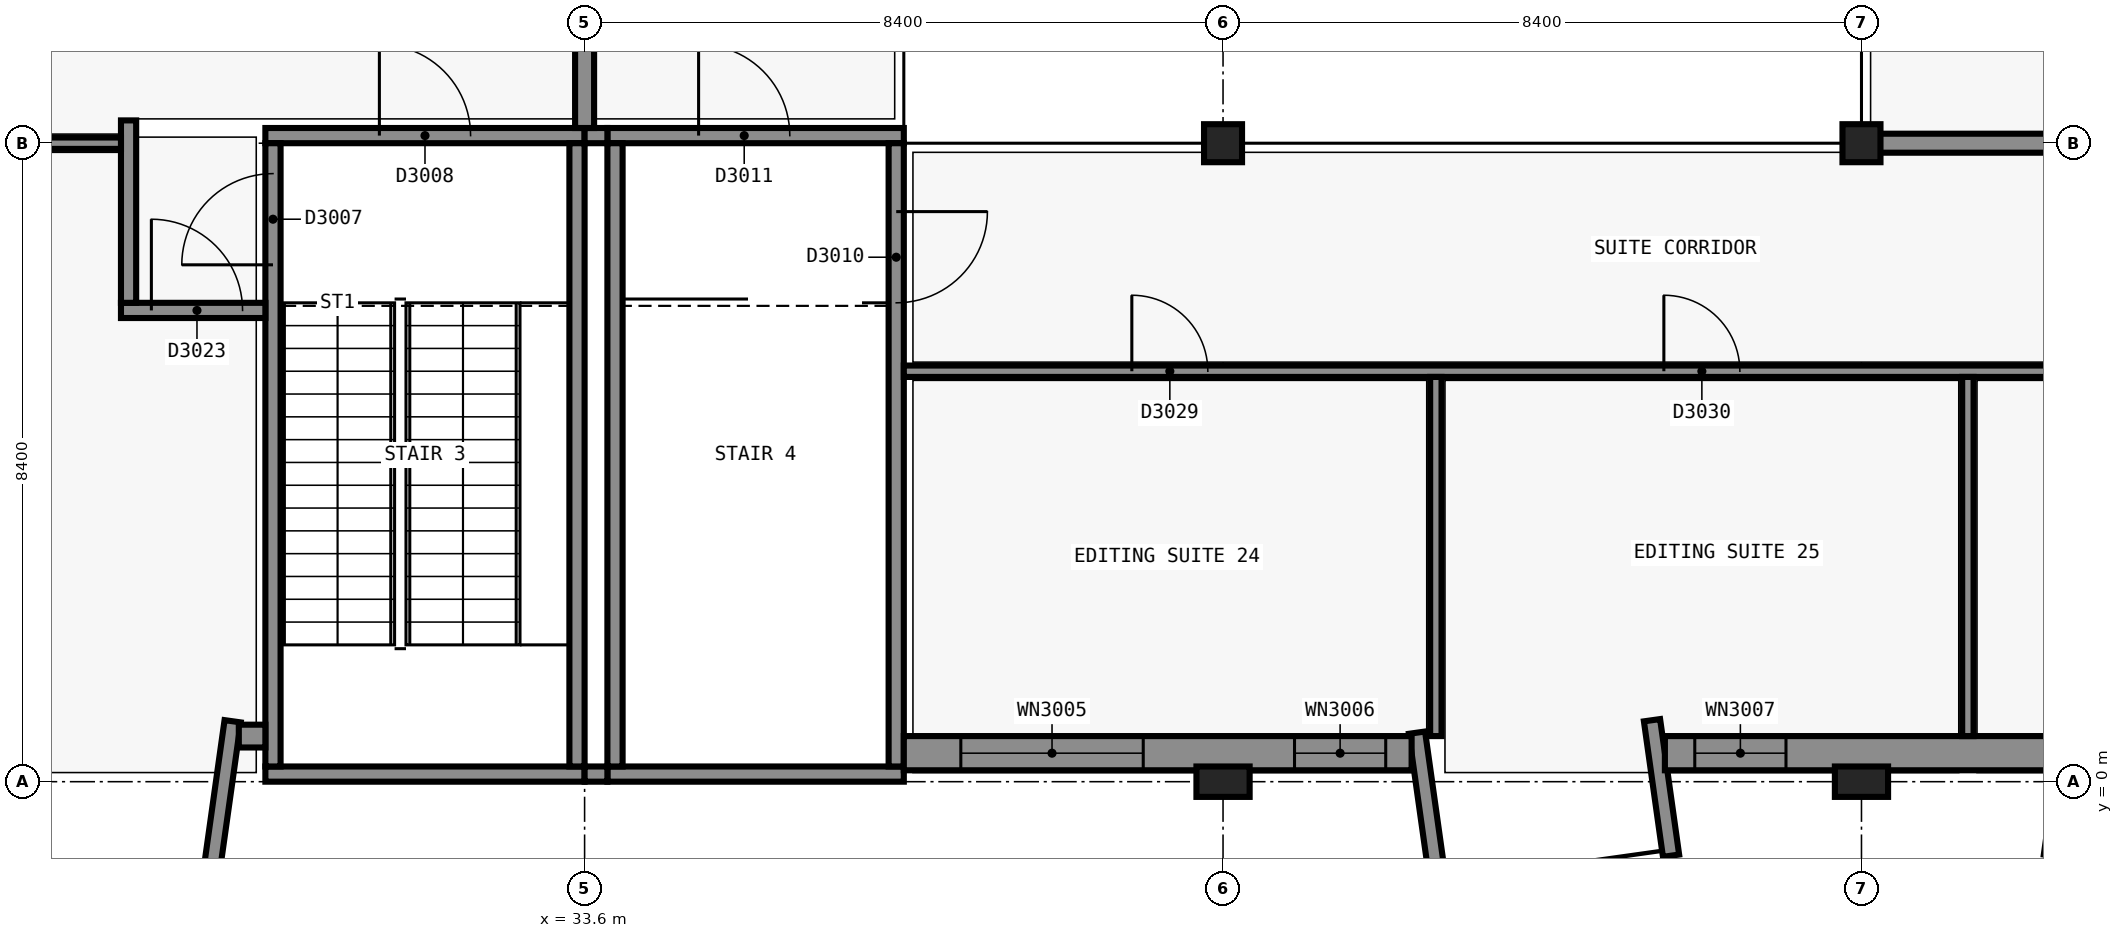
"""IFC4 building model, lengths in metres.
Left out: names, types, materials, properties, quantities, classifications, styles, units other than length and angle.
Written with IfcOpenShell. Run it as: python <this file> out.ifc"""

import sys

from ifc_helpers import new_model, si_unit, direction, frame, frame_2d, origin, origin_2d, place, context, subcontext, project, spatial, rectangle, extrude, element, fill, save


model = new_model("IFC4")
c1 = context("Model", 3, precision=1e-05, world=origin(), true_north=direction((0.0, 1.0)))
c2 = subcontext(c1, "Body", "Model", "MODEL_VIEW")
j1 = project(units=[si_unit("LENGTHUNIT", "METRE"), si_unit("PLANEANGLEUNIT", "RADIAN")], contexts=[c1])
p1 = place(None, origin())
s1 = spatial("IfcSite", under=j1, at=p1, CompositionType="ELEMENT")
p2 = place(p1, origin())
s2 = spatial("IfcBuilding", under=s1, at=p2, CompositionType="ELEMENT")
p3 = place(p2, frame((0.0, 0.0, 15.0)))
s3 = spatial("IfcBuildingStorey", under=s2, at=p3, CompositionType="ELEMENT", Elevation=15.0)
p4 = place(p3, frame((33.6, 0.1, 0.0), z_axis=(0.0, 0.0, 1.0), x_axis=(-1.0, 0.0, 0.0)))
e1 = element("IfcWall", 1, at=p4, inside=s3, PredefinedType="SHEAR", context=c2, shape_type="SweptSolid", body=[
    extrude(rectangle(XDim=4.2, YDim=0.2, at=frame_2d((2.1, 0.0))), origin(), (0.0, 0.0, 1.0), 4.8),
])
p5 = place(p3, frame((29.4, 8.5, 0.0), z_axis=(0.0, 0.0, 1.0), x_axis=(1.0, 0.0, 0.0)))
e2 = element("IfcWall", 2, at=p5, inside=s3, PredefinedType="SHEAR", context=c2, shape_type="SweptSolid", body=[
    extrude(rectangle(XDim=4.2, YDim=0.2, at=frame_2d((2.1, 0.0))), origin(), (0.0, 0.0, 1.0), 4.8),
])
p6 = place(p5, frame((1.5, 0.0, 0.0)))
e3 = element("IfcOpeningElement", 3, at=p6, cuts=e2, PredefinedType="OPENING", context=c2, shape_type="SweptSolid", body=[
    extrude(rectangle(XDim=1.2, YDim=2.1, at=frame_2d((0.6, 1.05))), frame((0.0, 0.11, 0.0), z_axis=(0.0, -1.0, 0.0), x_axis=(1.0, 0.0, 0.0)), (0.0, 0.0, 1.0), 0.22),
])
p7 = place(p3, frame((29.5, 0.2, 0.0), z_axis=(0.0, 0.0, 1.0), x_axis=(0.0, 1.0, 0.0)))
e4 = element("IfcWall", 4, at=p7, inside=s3, PredefinedType="SHEAR", context=c2, shape_type="SweptSolid", body=[
    extrude(rectangle(XDim=8.2, YDim=0.2, at=frame_2d((4.1, 0.0))), origin(), (0.0, 0.0, 1.0), 4.8),
])
p8 = place(p7, frame((6.6, 0.0, 0.0)))
e5 = element("IfcOpeningElement", 5, at=p8, cuts=e4, PredefinedType="OPENING", context=c2, shape_type="SweptSolid", body=[
    extrude(rectangle(XDim=1.2, YDim=2.1, at=frame_2d((0.6, 1.05))), frame((0.0, 0.11, 0.0), z_axis=(0.0, -1.0, 0.0), x_axis=(1.0, 0.0, 0.0)), (0.0, 0.0, 1.0), 0.22),
])
p9 = place(p3, frame((33.5, 8.4, 0.0), z_axis=(0.0, 0.0, 1.0), x_axis=(0.0, -1.0, 0.0)))
e6 = element("IfcWall", 6, at=p9, inside=s3, PredefinedType="SHEAR", context=c2, shape_type="SweptSolid", body=[
    extrude(rectangle(XDim=8.2, YDim=0.2, at=frame_2d((4.1, 0.0))), origin(), (0.0, 0.0, 1.0), 4.8),
])
p10 = place(p3, frame((37.8, 0.1, 0.0), z_axis=(0.0, 0.0, 1.0), x_axis=(-1.0, 0.0, 0.0)))
e7 = element("IfcWall", 7, at=p10, inside=s3, PredefinedType="SHEAR", context=c2, shape_type="SweptSolid", body=[
    extrude(rectangle(XDim=3.9, YDim=0.2, at=frame_2d((1.95, 0.0))), origin(), (0.0, 0.0, 1.0), 4.8),
])
p11 = place(p3, frame((33.9, 8.5, 0.0), z_axis=(0.0, 0.0, 1.0), x_axis=(1.0, 0.0, 0.0)))
e8 = element("IfcWall", 8, at=p11, inside=s3, PredefinedType="SHEAR", context=c2, shape_type="SweptSolid", body=[
    extrude(rectangle(XDim=3.9, YDim=0.2, at=frame_2d((1.95, 0.0))), origin(), (0.0, 0.0, 1.0), 4.8),
])
p12 = place(p11, frame((1.2, 0.0, 0.0)))
e9 = element("IfcOpeningElement", 9, at=p12, cuts=e8, PredefinedType="OPENING", context=c2, shape_type="SweptSolid", body=[
    extrude(rectangle(XDim=1.2, YDim=2.1, at=frame_2d((0.6, 1.05))), frame((0.0, 0.11, 0.0), z_axis=(0.0, -1.0, 0.0), x_axis=(1.0, 0.0, 0.0)), (0.0, 0.0, 1.0), 0.22),
])
p13 = place(p3, frame((34.0, 0.2, 0.0), z_axis=(0.0, 0.0, 1.0), x_axis=(0.0, 1.0, 0.0)))
e10 = element("IfcWall", 10, at=p13, inside=s3, PredefinedType="SHEAR", context=c2, shape_type="SweptSolid", body=[
    extrude(rectangle(XDim=8.2, YDim=0.2, at=frame_2d((4.1, 0.0))), origin(), (0.0, 0.0, 1.0), 4.8),
])
p14 = place(p3, frame((37.7, 8.4, 0.0), z_axis=(0.0, 0.0, 1.0), x_axis=(0.0, -1.0, 0.0)))
e11 = element("IfcWall", 11, at=p14, inside=s3, PredefinedType="SHEAR", context=c2, shape_type="SweptSolid", body=[
    extrude(rectangle(XDim=8.2, YDim=0.2, at=frame_2d((4.1, 0.0))), origin(), (0.0, 0.0, 1.0), 4.8),
])
p15 = place(p14, frame((0.9, 0.0, 0.0)))
e12 = element("IfcOpeningElement", 12, at=p15, cuts=e11, PredefinedType="OPENING", context=c2, shape_type="SweptSolid", body=[
    extrude(rectangle(XDim=1.2, YDim=2.1, at=frame_2d((0.6, 1.05))), frame((0.0, 0.11, 0.0), z_axis=(0.0, -1.0, 0.0), x_axis=(1.0, 0.0, 0.0)), (0.0, 0.0, 1.0), 0.22),
])
p16 = place(p3, frame((42.0, 0.0, 0.0), z_axis=(0.0, 0.0, 1.0), x_axis=(1.0, 0.0, 0.0)))
e13 = element("IfcColumn", 13, at=p16, inside=s3, PredefinedType="COLUMN", context=c2, shape_type="SweptSolid", body=[
    extrude(rectangle(XDim=0.7, YDim=0.4, at=origin_2d()), origin(), (0.0, 0.0, 1.0), 4.8),
])
p17 = place(p3, frame((42.0, 8.4, 0.0), z_axis=(0.0, 0.0, 1.0), x_axis=(1.0, 0.0, 0.0)))
e14 = element("IfcColumn", 14, at=p17, inside=s3, PredefinedType="COLUMN", context=c2, shape_type="SweptSolid", body=[
    extrude(rectangle(XDim=0.5, YDim=0.5, at=origin_2d()), origin(), (0.0, 0.0, 1.0), 4.8),
])
p18 = place(p3, frame((50.4, 0.0, 0.0), z_axis=(0.0, 0.0, 1.0), x_axis=(1.0, 0.0, 0.0)))
e15 = element("IfcColumn", 15, at=p18, inside=s3, PredefinedType="COLUMN", context=c2, shape_type="SweptSolid", body=[
    extrude(rectangle(XDim=0.7, YDim=0.4, at=origin_2d()), origin(), (0.0, 0.0, 1.0), 4.8),
])
p19 = place(p3, frame((50.4, 8.4, 0.0), z_axis=(0.0, 0.0, 1.0), x_axis=(1.0, 0.0, 0.0)))
e16 = element("IfcColumn", 16, at=p19, inside=s3, PredefinedType="COLUMN", context=c2, shape_type="SweptSolid", body=[
    extrude(rectangle(XDim=0.5, YDim=0.5, at=origin_2d()), origin(), (0.0, 0.0, 1.0), 4.8),
])
for number, where, z_axis, x_axis in (
    (17, (33.9, 0.1, 0.0), (0.0, 0.0, 1.0), (-1.0, 0.0, 0.0)),
    (18, (33.6, 8.5, 0.0), (0.0, 0.0, 1.0), (1.0, 0.0, 0.0)),
):
    element("IfcWall", number, at=place(p3, frame(where, z_axis=z_axis, x_axis=x_axis)), inside=s3, PredefinedType="SHEAR", context=c2, shape_type="SweptSolid", body=[
        extrude(rectangle(XDim=0.3, YDim=0.2, at=frame_2d((0.15, 0.0))), origin(), (0.0, 0.0, 1.0), 4.8),
    ])
p20 = place(p3, frame((28.969, 0.795, 0.0), z_axis=(0.0, 0.0, 1.0), x_axis=(-0.139249775508, -0.99025728981, 0.0)))
e19 = element("IfcWall", 19, at=p20, inside=s3, PredefinedType="SOLIDWALL", context=c2, shape_type="SweptSolid", body=[
    extrude(rectangle(XDim=2.22, YDim=0.215, at=frame_2d((1.11, 0.0))), origin(), (0.0, 0.0, 1.0), 4.5),
])
p21 = place(p3, frame((29.4, 0.6, 0.0), z_axis=(0.0, 0.0, 1.0), x_axis=(-1.0, 0.0, 0.0)))
e20 = element("IfcWall", 20, at=p21, inside=s3, PredefinedType="SOLIDWALL", context=c2, shape_type="SweptSolid", body=[
    extrude(rectangle(XDim=0.349, YDim=0.3, at=frame_2d((0.175, 0.0))), origin(), (0.0, 0.0, 1.0), 4.5),
])
p22 = place(p3, frame((44.552, 0.645, 0.0), z_axis=(0.0, 0.0, 1.0), x_axis=(0.139173441018, -0.990268020949, 0.0)))
e21 = element("IfcWall", 21, at=p22, inside=s3, PredefinedType="SOLIDWALL", context=c2, shape_type="SweptSolid", body=[
    extrude(rectangle(XDim=2.068, YDim=0.215, at=frame_2d((1.034, 0.0))), origin(), (0.0, 0.0, 1.0), 4.5),
])
for number, where, z_axis, x_axis in (
    (22, (47.644, 0.809, 0.0), (0.0, 0.0, 1.0), (0.139, -0.99, 0.0)),
    (23, (53.156, 0.809, 0.0), (0.0, 0.0, 1.0), (-0.139, -0.99, 0.0)),
):
    element("IfcWall", number, at=place(p3, frame(where, z_axis=z_axis, x_axis=x_axis)), inside=s3, PredefinedType="SOLIDWALL", context=c2, shape_type="SweptSolid", body=[
        extrude(rectangle(XDim=1.8, YDim=0.215, at=frame_2d((0.9, 0.0))), origin(), (0.0, 0.0, 1.0), 4.5),
    ])
p23 = place(p3, frame((44.481, 0.375, 0.0), z_axis=(0.0, 0.0, 1.0), x_axis=(-1.0, 0.0, 0.0)))
e24 = element("IfcWall", 24, at=p23, inside=s3, PredefinedType="SOLIDWALL", context=c2, shape_type="SweptSolid", body=[
    extrude(rectangle(XDim=6.681, YDim=0.45, at=frame_2d((3.341, 0.0))), origin(), (0.0, 0.0, 1.0), 4.5),
])
p24 = place(p23, frame((3.531, 0.0, 0.9)))
e25 = element("IfcOpeningElement", 25, at=p24, cuts=e24, PredefinedType="OPENING", context=c2, shape_type="SweptSolid", body=[
    extrude(rectangle(XDim=2.4, YDim=1.5, at=frame_2d((1.2, 0.75))), frame((0.0, 0.235, 0.0), z_axis=(0.0, -1.0, 0.0), x_axis=(1.0, 0.0, 0.0)), (0.0, 0.0, 1.0), 0.47),
])
p25 = place(p23, frame((0.341, 0.0, 0.9)))
e26 = element("IfcOpeningElement", 26, at=p25, cuts=e24, PredefinedType="OPENING", context=c2, shape_type="SweptSolid", body=[
    extrude(rectangle(XDim=1.2, YDim=1.5, at=frame_2d((0.6, 0.75))), frame((0.0, 0.235, 0.0), z_axis=(0.0, -1.0, 0.0), x_axis=(1.0, 0.0, 0.0)), (0.0, 0.0, 1.0), 0.47),
])
p26 = place(p3, frame((52.987, 0.375, 0.0), z_axis=(0.0, 0.0, 1.0), x_axis=(-1.0, 0.0, 0.0)))
e27 = element("IfcWall", 27, at=p26, inside=s3, PredefinedType="SOLIDWALL", context=c2, shape_type="SweptSolid", body=[
    extrude(rectangle(XDim=5.173, YDim=0.45, at=frame_2d((2.586, 0.0))), origin(), (0.0, 0.0, 1.0), 4.5),
])
p27 = place(p26, frame((3.58, 0.0, 0.9)))
e28 = element("IfcOpeningElement", 28, at=p27, cuts=e27, PredefinedType="OPENING", context=c2, shape_type="SweptSolid", body=[
    extrude(rectangle(XDim=1.2, YDim=1.5, at=frame_2d((0.6, 0.75))), frame((0.0, 0.235, 0.0), z_axis=(0.0, -1.0, 0.0), x_axis=(1.0, 0.0, 0.0)), (0.0, 0.0, 1.0), 0.47),
])
p28 = place(p3, frame((50.275, 8.4, 0.0), z_axis=(0.0, 0.0, 1.0), x_axis=(1.0, 0.0, 0.0)))
e29 = element("IfcWall", 29, at=p28, inside=s3, PredefinedType="PARTITIONING", context=c2, shape_type="SweptSolid", body=[
    extrude(rectangle(XDim=7.825, YDim=0.25, at=frame_2d((3.913, 0.0))), origin(), (0.0, 0.0, 1.0), 3.7),
])
p29 = place(p28, frame((3.625, 0.0, 0.0)))
e30 = element("IfcOpeningElement", 30, at=p29, cuts=e29, PredefinedType="OPENING", context=c2, shape_type="SweptSolid", body=[
    extrude(rectangle(XDim=1.2, YDim=2.1, at=frame_2d((0.6, 1.05))), frame((0.0, 0.135, 0.0), z_axis=(0.0, -1.0, 0.0), x_axis=(1.0, 0.0, 0.0)), (0.0, 0.0, 1.0), 0.27),
])
p30 = place(p3, frame((33.6, 8.6, 0.0), z_axis=(0.0, 0.0, 1.0), x_axis=(0.0, 1.0, 0.0)))
e31 = element("IfcWall", 31, at=p30, inside=s3, PredefinedType="SOLIDWALL", context=c2, shape_type="SweptSolid", body=[
    extrude(rectangle(XDim=15.85, YDim=0.25, at=frame_2d((7.925, 0.0))), origin(), (0.0, 0.0, 1.0), 3.8),
])
p31 = place(p3, frame((27.5, 6.2, 0.0), z_axis=(0.0, 0.0, 1.0), x_axis=(1.0, 0.0, 0.0)))
e32 = element("IfcWall", 32, at=p31, inside=s3, PredefinedType="SOLIDWALL", context=c2, shape_type="SweptSolid", body=[
    extrude(rectangle(XDim=1.9, YDim=0.2, at=frame_2d((0.95, 0.0))), origin(), (0.0, 0.0, 1.0), 4.5),
])
p32 = place(p31, frame((0.4, 0.0, 0.0)))
e33 = element("IfcOpeningElement", 33, at=p32, cuts=e32, PredefinedType="OPENING", context=c2, shape_type="SweptSolid", body=[
    extrude(rectangle(XDim=1.2, YDim=2.1, at=frame_2d((0.6, 1.05))), frame((0.0, 0.11, 0.0), z_axis=(0.0, -1.0, 0.0), x_axis=(1.0, 0.0, 0.0)), (0.0, 0.0, 1.0), 0.22),
])
p33 = place(p3, frame((27.6, 6.3, 0.0), z_axis=(0.0, 0.0, 1.0), x_axis=(0.0, 1.0, 0.0)))
e34 = element("IfcWall", 34, at=p33, inside=s3, PredefinedType="SOLIDWALL", context=c2, shape_type="SweptSolid", body=[
    extrude(rectangle(XDim=2.4, YDim=0.2, at=frame_2d((1.2, 0.0))), origin(), (0.0, 0.0, 1.0), 4.0),
])
p34 = place(p3, frame((37.8, 5.4, 0.0), z_axis=(0.0, 0.0, 1.0), x_axis=(1.0, 0.0, 0.0)))
e35 = element("IfcWall", 35, at=p34, inside=s3, PredefinedType="PARTITIONING", context=c2, shape_type="SweptSolid", body=[
    extrude(rectangle(XDim=20.3, YDim=0.15, at=frame_2d((10.15, 0.0))), origin(), (0.0, 0.0, 1.0), 3.7),
])
p35 = place(p34, frame((3.0, 0.0, 0.0)))
e36 = element("IfcOpeningElement", 36, at=p35, cuts=e35, PredefinedType="OPENING", context=c2, shape_type="SweptSolid", body=[
    extrude(rectangle(XDim=1.0, YDim=2.1, at=frame_2d((0.5, 1.05))), frame((0.0, 0.085, 0.0), z_axis=(0.0, -1.0, 0.0), x_axis=(1.0, 0.0, 0.0)), (0.0, 0.0, 1.0), 0.17),
])
p36 = place(p34, frame((10.0, 0.0, 0.0)))
e37 = element("IfcOpeningElement", 37, at=p36, cuts=e35, PredefinedType="OPENING", context=c2, shape_type="SweptSolid", body=[
    extrude(rectangle(XDim=1.0, YDim=2.1, at=frame_2d((0.5, 1.05))), frame((0.0, 0.085, 0.0), z_axis=(0.0, -1.0, 0.0), x_axis=(1.0, 0.0, 0.0)), (0.0, 0.0, 1.0), 0.17),
])
p37 = place(p34, frame((16.9, 0.0, 0.0)))
e38 = element("IfcOpeningElement", 38, at=p37, cuts=e35, PredefinedType="OPENING", context=c2, shape_type="SweptSolid", body=[
    extrude(rectangle(XDim=1.0, YDim=2.1, at=frame_2d((0.5, 1.05))), frame((0.0, 0.085, 0.0), z_axis=(0.0, -1.0, 0.0), x_axis=(1.0, 0.0, 0.0)), (0.0, 0.0, 1.0), 0.17),
])
p38 = place(p3, frame((25.125, 8.4, 0.0), z_axis=(0.0, 0.0, 1.0), x_axis=(1.0, 0.0, 0.0)))
e39 = element("IfcWall", 39, at=p38, inside=s3, PredefinedType="PARTITIONING", context=c2, shape_type="SweptSolid", body=[
    extrude(rectangle(XDim=2.375, YDim=0.15, at=frame_2d((1.188, 0.0))), origin(), (0.0, 0.0, 1.0), 3.8),
])
for number, where, z_axis, x_axis in (
    (40, (44.8, 0.6, 0.0), (0.0, 0.0, 1.0), (0.0, 1.0, 0.0)),
    (41, (51.8, 0.6, 0.0), (0.0, 0.0, 1.0), (0.0, 1.0, 0.0)),
):
    element("IfcWall", number, at=place(p3, frame(where, z_axis=z_axis, x_axis=x_axis)), inside=s3, PredefinedType="PARTITIONING", context=c2, shape_type="SweptSolid", body=[
        extrude(rectangle(XDim=4.725, YDim=0.15, at=frame_2d((2.362, 0.0))), origin(), (0.0, 0.0, 1.0), 4.4),
    ])
p39 = place(p24, origin())
e42 = element("IfcWindow", 42, at=p39, inside=s3, PartitioningType="SINGLE_PANEL", PredefinedType="WINDOW", context=c2, shape_type="SweptSolid", body=[
    extrude(rectangle(XDim=2.4, YDim=1.5, at=frame_2d((1.2, 0.75))), frame((0.0, 0.03, 0.0), z_axis=(0.0, -1.0, 0.0), x_axis=(1.0, 0.0, 0.0)), (0.0, 0.0, 1.0), 0.06),
])
fill(e25, e42)
p40 = place(p25, origin())
e43 = element("IfcWindow", 43, at=p40, inside=s3, PartitioningType="SINGLE_PANEL", PredefinedType="WINDOW", context=c2, shape_type="SweptSolid", body=[
    extrude(rectangle(XDim=1.2, YDim=1.5, at=frame_2d((0.6, 0.75))), frame((0.0, 0.03, 0.0), z_axis=(0.0, -1.0, 0.0), x_axis=(1.0, 0.0, 0.0)), (0.0, 0.0, 1.0), 0.06),
])
fill(e26, e43)
p41 = place(p27, origin())
e44 = element("IfcWindow", 44, at=p41, inside=s3, PartitioningType="SINGLE_PANEL", PredefinedType="WINDOW", context=c2, shape_type="SweptSolid", body=[
    extrude(rectangle(XDim=1.2, YDim=1.5, at=frame_2d((0.6, 0.75))), frame((0.0, 0.03, 0.0), z_axis=(0.0, -1.0, 0.0), x_axis=(1.0, 0.0, 0.0)), (0.0, 0.0, 1.0), 0.06),
])
fill(e28, e44)
p42 = place(p8, origin())
e45 = element("IfcDoor", 45, at=p42, inside=s3, OperationType="SINGLE_SWING_RIGHT", PredefinedType="DOOR", context=c2, shape_type="SweptSolid", body=[
    extrude(rectangle(XDim=1.2, YDim=2.1, at=frame_2d((0.6, 1.05))), frame((0.0, 0.025, 0.0), z_axis=(0.0, -1.0, 0.0), x_axis=(1.0, 0.0, 0.0)), (0.0, 0.0, 1.0), 0.05),
])
fill(e5, e45)
p43 = place(p6, origin())
e46 = element("IfcDoor", 46, at=p43, inside=s3, OperationType="SINGLE_SWING_RIGHT", PredefinedType="DOOR", context=c2, shape_type="SweptSolid", body=[
    extrude(rectangle(XDim=1.2, YDim=2.1, at=frame_2d((0.6, 1.05))), frame((0.0, 0.025, 0.0), z_axis=(0.0, -1.0, 0.0), x_axis=(1.0, 0.0, 0.0)), (0.0, 0.0, 1.0), 0.05),
])
fill(e3, e46)
p44 = place(p15, origin())
e47 = element("IfcDoor", 47, at=p44, inside=s3, OperationType="SINGLE_SWING_RIGHT", PredefinedType="DOOR", context=c2, shape_type="SweptSolid", body=[
    extrude(rectangle(XDim=1.2, YDim=2.1, at=frame_2d((0.6, 1.05))), frame((0.0, 0.025, 0.0), z_axis=(0.0, -1.0, 0.0), x_axis=(1.0, 0.0, 0.0)), (0.0, 0.0, 1.0), 0.05),
])
fill(e12, e47)
p45 = place(p12, origin())
e48 = element("IfcDoor", 48, at=p45, inside=s3, OperationType="SINGLE_SWING_RIGHT", PredefinedType="DOOR", context=c2, shape_type="SweptSolid", body=[
    extrude(rectangle(XDim=1.2, YDim=2.1, at=frame_2d((0.6, 1.05))), frame((0.0, 0.025, 0.0), z_axis=(0.0, -1.0, 0.0), x_axis=(1.0, 0.0, 0.0)), (0.0, 0.0, 1.0), 0.05),
])
fill(e9, e48)
p46 = place(p32, origin())
e49 = element("IfcDoor", 49, at=p46, inside=s3, OperationType="SINGLE_SWING_RIGHT", PredefinedType="DOOR", context=c2, shape_type="SweptSolid", body=[
    extrude(rectangle(XDim=1.2, YDim=2.1, at=frame_2d((0.6, 1.05))), frame((0.0, 0.025, 0.0), z_axis=(0.0, -1.0, 0.0), x_axis=(1.0, 0.0, 0.0)), (0.0, 0.0, 1.0), 0.05),
])
fill(e33, e49)
p47 = place(p35, origin())
e50 = element("IfcDoor", 50, at=p47, inside=s3, OperationType="SINGLE_SWING_RIGHT", PredefinedType="DOOR", context=c2, shape_type="SweptSolid", body=[
    extrude(rectangle(XDim=1.0, YDim=2.1, at=frame_2d((0.5, 1.05))), frame((0.0, 0.025, 0.0), z_axis=(0.0, -1.0, 0.0), x_axis=(1.0, 0.0, 0.0)), (0.0, 0.0, 1.0), 0.05),
])
fill(e36, e50)
p48 = place(p36, origin())
e51 = element("IfcDoor", 51, at=p48, inside=s3, OperationType="SINGLE_SWING_RIGHT", PredefinedType="DOOR", context=c2, shape_type="SweptSolid", body=[
    extrude(rectangle(XDim=1.0, YDim=2.1, at=frame_2d((0.5, 1.05))), frame((0.0, 0.025, 0.0), z_axis=(0.0, -1.0, 0.0), x_axis=(1.0, 0.0, 0.0)), (0.0, 0.0, 1.0), 0.05),
])
fill(e37, e51)
save(model, sys.argv[1])
